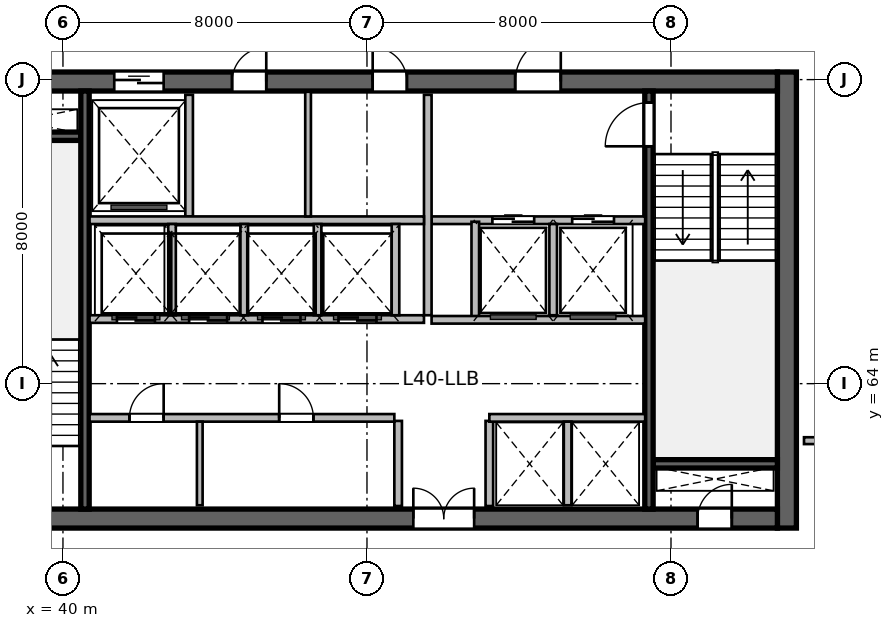
"""IFC4 building model, lengths in metres.
Left out: names, types, materials, properties, quantities, classifications, styles, units other than length and angle.
Written with IfcOpenShell. Run it as: python <this file> out.ifc"""

import sys

from ifc_helpers import new_model, si_unit, direction, frame, frame_2d, origin, place, context, subcontext, project, spatial, rectangle, extrude, source, transform, mapped, element, fill, save


model = new_model("IFC4")
c1 = context("Model", 3, precision=1e-05, world=origin(), true_north=direction((0.0, 1.0)))
c2 = subcontext(c1, "Body", "Model", "MODEL_VIEW")
j1 = project(units=[si_unit("LENGTHUNIT", "METRE"), si_unit("PLANEANGLEUNIT", "RADIAN")], contexts=[c1])
p1 = place(None, origin())
s1 = spatial("IfcSite", under=j1, at=p1, CompositionType="ELEMENT")
p2 = place(p1, origin())
s2 = spatial("IfcBuilding", under=s1, at=p2, CompositionType="ELEMENT")
p3 = place(p2, frame((0.0, 0.0, 166.2)))
s3 = spatial("IfcBuildingStorey", under=s2, at=p3, CompositionType="ELEMENT", Elevation=166.2)
m1 = source(origin(), c2, "Body", "SweptSolid", [
    extrude(rectangle(XDim=12.0, YDim=0.5, at=frame_2d((6.0, 0.0))), origin(), (0.0, 0.0, 1.0), 3.9),
])
p4 = place(p3, frame((59.05, 60.2, 0.0), z_axis=(0.0, 0.0, 1.0), x_axis=(0.0, 1.0, 0.0)))
e1 = element("IfcWall", 1, at=p4, inside=s3, PredefinedType="SHEAR", context=c2, shape_type="MappedRepresentation", body=[
    mapped(m1, transform((0.0, 0.0, 0.0), scale=1.0)),
])
m2 = source(origin(), c2, "Body", "SweptSolid", [
    extrude(rectangle(XDim=21.6, YDim=0.5, at=frame_2d((10.8, 0.0))), origin(), (0.0, 0.0, 1.0), 3.9),
])
p5 = place(p3, frame((37.2, 60.45, 0.0), z_axis=(0.0, 0.0, 1.0), x_axis=(1.0, 0.0, 0.0)))
e2 = element("IfcWall", 2, at=p5, inside=s3, PredefinedType="SHEAR", context=c2, shape_type="MappedRepresentation", body=[
    mapped(m2, transform((0.0, 0.0, 0.0), scale=1.0)),
])
p6 = place(p5, frame((1.1, 0.0, 0.0)))
e3 = element("IfcOpeningElement", 3, at=p6, cuts=e2, PredefinedType="OPENING", context=c2, shape_type="SweptSolid", body=[
    extrude(rectangle(XDim=1.15, YDim=2.15, at=frame_2d((0.575, 1.075))), frame((0.0, 0.26, 0.0), z_axis=(0.0, -1.0, 0.0), x_axis=(1.0, 0.0, 0.0)), (0.0, 0.0, 1.0), 0.52),
])
p7 = place(p5, frame((19.5, 0.0, 0.0)))
e4 = element("IfcOpeningElement", 4, at=p7, cuts=e2, PredefinedType="OPENING", context=c2, shape_type="SweptSolid", body=[
    extrude(rectangle(XDim=0.9, YDim=2.1, at=frame_2d((0.45, 1.05))), frame((0.0, 0.26, 0.0), z_axis=(0.0, -1.0, 0.0), x_axis=(1.0, 0.0, 0.0)), (0.0, 0.0, 1.0), 0.52),
])
p8 = place(p5, frame((12.02, 0.0, 0.0)))
e5 = element("IfcOpeningElement", 5, at=p8, cuts=e2, PredefinedType="OPENING", context=c2, shape_type="SweptSolid", body=[
    extrude(rectangle(XDim=1.6, YDim=2.15, at=frame_2d((0.8, 1.075))), frame((0.0, 0.26, 0.0), z_axis=(0.0, -1.0, 0.0), x_axis=(1.0, 0.0, 0.0)), (0.0, 0.0, 1.0), 0.52),
])
p9 = place(p3, frame((37.2, 71.95, 0.0), z_axis=(0.0, 0.0, 1.0), x_axis=(1.0, 0.0, 0.0)))
e6 = element("IfcWall", 6, at=p9, inside=s3, PredefinedType="SHEAR", context=c2, shape_type="MappedRepresentation", body=[
    mapped(m2, transform((0.0, 0.0, 0.0), scale=1.0)),
])
p10 = place(p9, frame((1.2, 0.0, 0.0)))
e7 = element("IfcOpeningElement", 7, at=p10, cuts=e6, PredefinedType="OPENING", context=c2, shape_type="SweptSolid", body=[
    extrude(rectangle(XDim=0.9, YDim=2.1, at=frame_2d((0.45, 1.05))), frame((0.0, 0.26, 0.0), z_axis=(0.0, -1.0, 0.0), x_axis=(1.0, 0.0, 0.0)), (0.0, 0.0, 1.0), 0.52),
])
p11 = place(p9, frame((14.7, 0.0, 0.0)))
e8 = element("IfcOpeningElement", 8, at=p11, cuts=e6, PredefinedType="OPENING", context=c2, shape_type="SweptSolid", body=[
    extrude(rectangle(XDim=1.2, YDim=2.15, at=frame_2d((0.6, 1.075))), frame((0.0, 0.26, 0.0), z_axis=(0.0, -1.0, 0.0), x_axis=(1.0, 0.0, 0.0)), (0.0, 0.0, 1.0), 0.52),
])
p12 = place(p9, frame((4.15, 0.0, 0.0)))
e9 = element("IfcOpeningElement", 9, at=p12, cuts=e6, PredefinedType="OPENING", context=c2, shape_type="SweptSolid", body=[
    extrude(rectangle(XDim=1.3, YDim=2.15, at=frame_2d((0.65, 1.075))), frame((0.0, 0.26, 0.0), z_axis=(0.0, -1.0, 0.0), x_axis=(1.0, 0.0, 0.0)), (0.0, 0.0, 1.0), 0.52),
])
p13 = place(p9, frame((7.25, 0.0, 0.0)))
e10 = element("IfcOpeningElement", 10, at=p13, cuts=e6, PredefinedType="OPENING", context=c2, shape_type="SweptSolid", body=[
    extrude(rectangle(XDim=0.9, YDim=2.1, at=frame_2d((0.45, 1.05))), frame((0.0, 0.26, 0.0), z_axis=(0.0, -1.0, 0.0), x_axis=(1.0, 0.0, 0.0)), (0.0, 0.0, 1.0), 0.52),
])
p14 = place(p9, frame((10.95, 0.0, 0.0)))
e11 = element("IfcOpeningElement", 11, at=p14, cuts=e6, PredefinedType="OPENING", context=c2, shape_type="SweptSolid", body=[
    extrude(rectangle(XDim=0.9, YDim=2.1, at=frame_2d((0.45, 1.05))), frame((0.0, 0.26, 0.0), z_axis=(0.0, -1.0, 0.0), x_axis=(1.0, 0.0, 0.0)), (0.0, 0.0, 1.0), 0.52),
])
m3 = source(origin(), c2, "Body", "SweptSolid", [
    extrude(rectangle(XDim=3.27, YDim=0.22, at=frame_2d((1.635, 0.0))), origin(), (0.0, 0.0, 1.0), 3.9),
])
for number, where, z_axis, x_axis in (
    (12, (37.2, 70.51, 0.0), (0.0, 0.0, 1.0), (1.0, 0.0, 0.0)),
    (13, (55.53, 61.89, 0.0), (0.0, 0.0, 1.0), (1.0, 0.0, 0.0)),
):
    element("IfcWall", number, at=place(p3, frame(where, z_axis=z_axis, x_axis=x_axis)), inside=s3, PredefinedType="SHEAR", context=c2, shape_type="MappedRepresentation", body=[
        mapped(m3, transform((0.0, 0.0, 0.0), scale=1.0)),
    ])
m4 = source(origin(), c2, "Body", "SweptSolid", [
    extrude(rectangle(XDim=11.0, YDim=0.22, at=frame_2d((5.5, 0.0))), origin(), (0.0, 0.0, 1.0), 3.9),
])
p15 = place(p3, frame((40.58, 60.7, 0.0), z_axis=(0.0, 0.0, 1.0), x_axis=(0.0, 1.0, 0.0)))
e14 = element("IfcWall", 14, at=p15, inside=s3, PredefinedType="SHEAR", context=c2, shape_type="MappedRepresentation", body=[
    mapped(m4, transform((0.0, 0.0, 0.0), scale=1.0)),
])
p16 = place(p3, frame((55.42, 60.7, 0.0), z_axis=(0.0, 0.0, 1.0), x_axis=(0.0, 1.0, 0.0)))
e15 = element("IfcWall", 15, at=p16, inside=s3, PredefinedType="SHEAR", context=c2, shape_type="MappedRepresentation", body=[
    mapped(m4, transform((0.0, 0.0, 0.0), scale=1.0)),
])
p17 = place(p16, frame((9.545, 0.0, 0.0)))
e16 = element("IfcOpeningElement", 16, at=p17, cuts=e15, PredefinedType="OPENING", context=c2, shape_type="SweptSolid", body=[
    extrude(rectangle(XDim=1.15, YDim=2.15, at=frame_2d((0.575, 1.075))), frame((0.0, 0.12, 0.0), z_axis=(0.0, -1.0, 0.0), x_axis=(1.0, 0.0, 0.0)), (0.0, 0.0, 1.0), 0.24),
])
m5 = source(origin(), c2, "Body", "SweptSolid", [
    extrude(rectangle(XDim=2.24, YDim=0.2, at=frame_2d((1.12, 0.0))), origin(), (0.0, 0.0, 1.0), 3.65),
])
for number, where, z_axis, x_axis in (
    (17, (48.82, 60.78, 0.0), (0.0, 0.0, 1.0), (0.0, 1.0, 0.0)),
    (18, (51.22, 60.78, 0.0), (0.0, 0.0, 1.0), (0.0, 1.0, 0.0)),
):
    element("IfcWall", number, at=place(p3, frame(where, z_axis=z_axis, x_axis=x_axis)), inside=s3, PredefinedType="SOLIDWALL", context=c2, shape_type="MappedRepresentation", body=[
        mapped(m5, transform((0.0, 0.0, 0.0), scale=1.0)),
    ])
m6 = source(origin(), c2, "Body", "SweptSolid", [
    extrude(rectangle(XDim=5.62, YDim=0.2, at=frame_2d((2.81, 0.0))), origin(), (0.0, 0.0, 1.0), 3.65),
])
p18 = place(p3, frame((49.7, 68.3, 0.0), z_axis=(0.0, 0.0, 1.0), x_axis=(1.0, 0.0, 0.0)))
e19 = element("IfcWall", 19, at=p18, inside=s3, PredefinedType="SOLIDWALL", context=c2, shape_type="MappedRepresentation", body=[
    mapped(m6, transform((0.0, 0.0, 0.0), scale=1.0)),
])
p19 = place(p18, frame((1.6, 0.0, 0.0)))
e20 = element("IfcOpeningElement", 20, at=p19, cuts=e19, PredefinedType="OPENING", context=c2, shape_type="SweptSolid", body=[
    extrude(rectangle(XDim=1.1, YDim=2.15, at=frame_2d((0.55, 1.075))), frame((0.0, 0.11, 0.0), z_axis=(0.0, -1.0, 0.0), x_axis=(1.0, 0.0, 0.0)), (0.0, 0.0, 1.0), 0.22),
])
p20 = place(p18, frame((3.7, 0.0, 0.0)))
e21 = element("IfcOpeningElement", 21, at=p20, cuts=e19, PredefinedType="OPENING", context=c2, shape_type="SweptSolid", body=[
    extrude(rectangle(XDim=1.1, YDim=2.15, at=frame_2d((0.55, 1.075))), frame((0.0, 0.11, 0.0), z_axis=(0.0, -1.0, 0.0), x_axis=(1.0, 0.0, 0.0)), (0.0, 0.0, 1.0), 0.22),
])
m7 = source(origin(), c2, "Body", "SweptSolid", [
    extrude(rectangle(XDim=5.8, YDim=0.2, at=frame_2d((2.9, 0.0))), origin(), (0.0, 0.0, 1.0), 3.65),
])
p21 = place(p3, frame((49.6, 65.8, 0.0), z_axis=(0.0, 0.0, 1.0), x_axis=(0.0, 1.0, 0.0)))
e22 = element("IfcWall", 22, at=p21, inside=s3, PredefinedType="SOLIDWALL", context=c2, shape_type="MappedRepresentation", body=[
    mapped(m7, transform((0.0, 0.0, 0.0), scale=1.0)),
])
m8 = source(origin(), c2, "Body", "SweptSolid", [
    extrude(rectangle(XDim=2.58, YDim=0.2, at=frame_2d((1.29, 0.0))), origin(), (0.0, 0.0, 1.0), 3.65),
])
p22 = place(p3, frame((50.85, 65.68, 0.0), z_axis=(0.0, 0.0, 1.0), x_axis=(0.0, 1.0, 0.0)))
e23 = element("IfcWall", 23, at=p22, inside=s3, PredefinedType="SOLIDWALL", context=c2, shape_type="MappedRepresentation", body=[
    mapped(m8, transform((0.0, 0.0, 0.0), scale=1.0)),
])
m9 = source(origin(), c2, "Body", "SweptSolid", [
    extrude(rectangle(XDim=2.4, YDim=0.2, at=frame_2d((1.2, 0.0))), origin(), (0.0, 0.0, 1.0), 3.65),
])
p23 = place(p3, frame((52.9, 65.8, 0.0), z_axis=(0.0, 0.0, 1.0), x_axis=(0.0, 1.0, 0.0)))
e24 = element("IfcWall", 24, at=p23, inside=s3, PredefinedType="SOLIDWALL", context=c2, shape_type="MappedRepresentation", body=[
    mapped(m9, transform((0.0, 0.0, 0.0), scale=1.0)),
])
p24 = place(p3, frame((49.7, 65.68, 0.0), z_axis=(0.0, 0.0, 1.0), x_axis=(1.0, 0.0, 0.0)))
e25 = element("IfcWall", 25, at=p24, inside=s3, PredefinedType="SOLIDWALL", context=c2, shape_type="MappedRepresentation", body=[
    mapped(m6, transform((0.0, 0.0, 0.0), scale=1.0)),
])
m10 = source(origin(), c2, "Body", "SweptSolid", [
    extrude(rectangle(XDim=3.2, YDim=0.2, at=frame_2d((1.6, 0.0))), origin(), (0.0, 0.0, 1.0), 3.65),
])
p25 = place(p3, frame((43.32, 68.4, 0.0), z_axis=(0.0, 0.0, 1.0), x_axis=(0.0, 1.0, 0.0)))
e26 = element("IfcWall", 26, at=p25, inside=s3, PredefinedType="SOLIDWALL", context=c2, shape_type="MappedRepresentation", body=[
    mapped(m10, transform((0.0, 0.0, 0.0), scale=1.0)),
])
m11 = source(origin(), c2, "Body", "SweptSolid", [
    extrude(rectangle(XDim=8.8, YDim=0.2, at=frame_2d((4.4, 0.0))), origin(), (0.0, 0.0, 1.0), 3.65),
])
p26 = place(p3, frame((40.7, 68.3, 0.0), z_axis=(0.0, 0.0, 1.0), x_axis=(1.0, 0.0, 0.0)))
e27 = element("IfcWall", 27, at=p26, inside=s3, PredefinedType="SOLIDWALL", context=c2, shape_type="MappedRepresentation", body=[
    mapped(m11, transform((0.0, 0.0, 0.0), scale=1.0)),
])
m12 = source(origin(), c2, "Body", "SweptSolid", [
    extrude(rectangle(XDim=3.28, YDim=0.15, at=frame_2d((1.64, 0.0))), origin(), (0.0, 0.0, 1.0), 3.65),
])
p27 = place(p3, frame((46.45, 68.4, 0.0), z_axis=(0.0, 0.0, 1.0), x_axis=(0.0, 1.0, 0.0)))
e28 = element("IfcWall", 28, at=p27, inside=s3, PredefinedType="PARTITIONING", context=c2, shape_type="MappedRepresentation", body=[
    mapped(m12, transform((0.0, 0.0, 0.0), scale=1.0)),
])
m13 = source(origin(), c2, "Body", "SweptSolid", [
    extrude(rectangle(XDim=8.02, YDim=0.2, at=frame_2d((4.01, 0.0))), origin(), (0.0, 0.0, 1.0), 3.65),
])
p28 = place(p3, frame((40.7, 63.1, 0.0), z_axis=(0.0, 0.0, 1.0), x_axis=(1.0, 0.0, 0.0)))
e29 = element("IfcWall", 29, at=p28, inside=s3, PredefinedType="SOLIDWALL", context=c2, shape_type="MappedRepresentation", body=[
    mapped(m13, transform((0.0, 0.0, 0.0), scale=1.0)),
])
p29 = place(p28, frame((1.05, 0.0, 0.0)))
e30 = element("IfcOpeningElement", 30, at=p29, cuts=e29, PredefinedType="OPENING", context=c2, shape_type="SweptSolid", body=[
    extrude(rectangle(XDim=0.9, YDim=2.1, at=frame_2d((0.45, 1.05))), frame((0.0, 0.11, 0.0), z_axis=(0.0, -1.0, 0.0), x_axis=(1.0, 0.0, 0.0)), (0.0, 0.0, 1.0), 0.22),
])
p30 = place(p28, frame((4.99, 0.0, 0.0)))
e31 = element("IfcOpeningElement", 31, at=p30, cuts=e29, PredefinedType="OPENING", context=c2, shape_type="SweptSolid", body=[
    extrude(rectangle(XDim=0.9, YDim=2.1, at=frame_2d((0.45, 1.05))), frame((0.0, 0.11, 0.0), z_axis=(0.0, -1.0, 0.0), x_axis=(1.0, 0.0, 0.0)), (0.0, 0.0, 1.0), 0.22),
])
m14 = source(origin(), c2, "Body", "SweptSolid", [
    extrude(rectangle(XDim=4.1, YDim=0.2, at=frame_2d((2.05, 0.0))), origin(), (0.0, 0.0, 1.0), 3.65),
])
p31 = place(p3, frame((51.22, 63.1, 0.0), z_axis=(0.0, 0.0, 1.0), x_axis=(1.0, 0.0, 0.0)))
e32 = element("IfcWall", 32, at=p31, inside=s3, PredefinedType="SOLIDWALL", context=c2, shape_type="MappedRepresentation", body=[
    mapped(m14, transform((0.0, 0.0, 0.0), scale=1.0)),
])
m15 = source(origin(), c2, "Body", "SweptSolid", [
    extrude(rectangle(XDim=2.2, YDim=0.15, at=frame_2d((1.1, 0.0))), origin(), (0.0, 0.0, 1.0), 3.65),
])
p32 = place(p3, frame((43.6, 60.8, 0.0), z_axis=(0.0, 0.0, 1.0), x_axis=(0.0, 1.0, 0.0)))
e33 = element("IfcWall", 33, at=p32, inside=s3, PredefinedType="PARTITIONING", context=c2, shape_type="MappedRepresentation", body=[
    mapped(m15, transform((0.0, 0.0, 0.0), scale=1.0)),
])
m16 = source(origin(), c2, "Body", "SweptSolid", [
    extrude(rectangle(XDim=2.2, YDim=0.2, at=frame_2d((1.1, 0.0))), origin(), (0.0, 0.0, 1.0), 3.65),
])
p33 = place(p3, frame((53.28, 60.8, 0.0), z_axis=(0.0, 0.0, 1.0), x_axis=(0.0, 1.0, 0.0)))
e34 = element("IfcWall", 34, at=p33, inside=s3, PredefinedType="SOLIDWALL", context=c2, shape_type="MappedRepresentation", body=[
    mapped(m16, transform((0.0, 0.0, 0.0), scale=1.0)),
])
p34 = place(p3, frame((40.7, 65.7, 0.0), z_axis=(0.0, 0.0, 1.0), x_axis=(1.0, 0.0, 0.0)))
e35 = element("IfcWall", 35, at=p34, inside=s3, PredefinedType="SOLIDWALL", context=c2, shape_type="MappedRepresentation", body=[
    mapped(m11, transform((0.0, 0.0, 0.0), scale=1.0)),
])
p35 = place(p34, frame((0.72, 0.0, 0.0)))
e36 = element("IfcOpeningElement", 36, at=p35, cuts=e35, PredefinedType="OPENING", context=c2, shape_type="SweptSolid", body=[
    extrude(rectangle(XDim=1.0, YDim=2.15, at=frame_2d((0.5, 1.075))), frame((0.0, 0.11, 0.0), z_axis=(0.0, -1.0, 0.0), x_axis=(1.0, 0.0, 0.0)), (0.0, 0.0, 1.0), 0.22),
])
p36 = place(p34, frame((2.62, 0.0, 0.0)))
e37 = element("IfcOpeningElement", 37, at=p36, cuts=e35, PredefinedType="OPENING", context=c2, shape_type="SweptSolid", body=[
    extrude(rectangle(XDim=1.0, YDim=2.15, at=frame_2d((0.5, 1.075))), frame((0.0, 0.11, 0.0), z_axis=(0.0, -1.0, 0.0), x_axis=(1.0, 0.0, 0.0)), (0.0, 0.0, 1.0), 0.22),
])
p37 = place(p34, frame((4.55, 0.0, 0.0)))
e38 = element("IfcOpeningElement", 38, at=p37, cuts=e35, PredefinedType="OPENING", context=c2, shape_type="SweptSolid", body=[
    extrude(rectangle(XDim=1.0, YDim=2.15, at=frame_2d((0.5, 1.075))), frame((0.0, 0.11, 0.0), z_axis=(0.0, -1.0, 0.0), x_axis=(1.0, 0.0, 0.0)), (0.0, 0.0, 1.0), 0.22),
])
p38 = place(p34, frame((6.55, 0.0, 0.0)))
e39 = element("IfcOpeningElement", 39, at=p38, cuts=e35, PredefinedType="OPENING", context=c2, shape_type="SweptSolid", body=[
    extrude(rectangle(XDim=1.0, YDim=2.15, at=frame_2d((0.5, 1.075))), frame((0.0, 0.11, 0.0), z_axis=(0.0, -1.0, 0.0), x_axis=(1.0, 0.0, 0.0)), (0.0, 0.0, 1.0), 0.22),
])
for number, where, z_axis, x_axis in (
    (40, (48.75, 65.8, 0.0), (0.0, 0.0, 1.0), (0.0, 1.0, 0.0)),
    (41, (42.87, 65.8, 0.0), (0.0, 0.0, 1.0), (0.0, 1.0, 0.0)),
    (42, (44.77, 65.8, 0.0), (0.0, 0.0, 1.0), (0.0, 1.0, 0.0)),
    (43, (46.7, 65.8, 0.0), (0.0, 0.0, 1.0), (0.0, 1.0, 0.0)),
):
    element("IfcWall", number, at=place(p3, frame(where, z_axis=z_axis, x_axis=x_axis)), inside=s3, PredefinedType="SOLIDWALL", context=c2, shape_type="MappedRepresentation", body=[
        mapped(m9, transform((0.0, 0.0, 0.0), scale=1.0)),
    ])
m17 = source(origin(), c2, "Body", "SweptSolid", [
    extrude(rectangle(XDim=4.96, YDim=0.18, at=frame_2d((2.48, 0.0))), origin(), (0.0, 0.0, 1.0), 3.65),
])
p39 = place(p3, frame((59.5, 62.5, 0.0), z_axis=(0.0, 0.0, 1.0), x_axis=(1.0, 0.0, 0.0)))
e44 = element("IfcWall", 44, at=p39, inside=s3, PredefinedType="PLUMBINGWALL", context=c2, shape_type="MappedRepresentation", body=[
    mapped(m17, transform((0.0, 0.0, 0.0), scale=1.0)),
])
m18 = source(origin(), c2, "Body", "SweptSolid", [
    extrude(rectangle(XDim=0.9, YDim=2.1, at=frame_2d((0.45, 1.05))), frame((0.0, 0.025, 0.0), z_axis=(0.0, -1.0, 0.0), x_axis=(1.0, 0.0, 0.0)), (0.0, 0.0, 1.0), 0.05),
])
p40 = place(p7, origin())
e45 = element("IfcDoor", 45, at=p40, inside=s3, OperationType="SINGLE_SWING_RIGHT", PredefinedType="DOOR", context=c2, shape_type="MappedRepresentation", body=[
    mapped(m18, transform((0.0, 0.0, 0.0), scale=1.0)),
])
fill(e4, e45)
m19 = source(origin(), c2, "Body", "SweptSolid", [
    extrude(rectangle(XDim=1.15, YDim=2.15, at=frame_2d((0.575, 1.075))), frame((0.0, 0.025, 0.0), z_axis=(0.0, -1.0, 0.0), x_axis=(1.0, 0.0, 0.0)), (0.0, 0.0, 1.0), 0.05),
])
p41 = place(p17, origin())
e46 = element("IfcDoor", 46, at=p41, inside=s3, OperationType="SINGLE_SWING_LEFT", PredefinedType="DOOR", context=c2, shape_type="MappedRepresentation", body=[
    mapped(m19, transform((0.0, 0.0, 0.0), scale=1.0)),
])
fill(e16, e46)
m20 = source(origin(), c2, "Body", "SweptSolid", [
    extrude(rectangle(XDim=1.6, YDim=2.15, at=frame_2d((0.8, 1.075))), frame((0.0, 0.025, 0.0), z_axis=(0.0, -1.0, 0.0), x_axis=(1.0, 0.0, 0.0)), (0.0, 0.0, 1.0), 0.05),
])
p42 = place(p8, origin())
e47 = element("IfcDoor", 47, at=p42, inside=s3, OperationType="DOUBLE_DOOR_SINGLE_SWING", PredefinedType="DOOR", context=c2, shape_type="MappedRepresentation", body=[
    mapped(m20, transform((0.0, 0.0, 0.0), scale=1.0)),
])
fill(e5, e47)
m21 = source(origin(), c2, "Body", "SweptSolid", [
    extrude(rectangle(XDim=1.2, YDim=2.15, at=frame_2d((0.6, 1.075))), frame((0.0, 0.025, 0.0), z_axis=(0.0, -1.0, 0.0), x_axis=(1.0, 0.0, 0.0)), (0.0, 0.0, 1.0), 0.05),
])
p43 = place(p11, origin())
e48 = element("IfcDoor", 48, at=p43, inside=s3, OperationType="SINGLE_SWING_RIGHT", PredefinedType="DOOR", context=c2, shape_type="MappedRepresentation", body=[
    mapped(m21, transform((0.0, 0.0, 0.0), scale=1.0)),
])
fill(e8, e48)
m22 = source(origin(), c2, "Body", "SweptSolid", [
    extrude(rectangle(XDim=1.1, YDim=2.15, at=frame_2d((0.55, 1.075))), frame((0.0, 0.025, 0.0), z_axis=(0.0, -1.0, 0.0), x_axis=(1.0, 0.0, 0.0)), (0.0, 0.0, 1.0), 0.05),
])
p44 = place(p19, origin())
e49 = element("IfcDoor", 49, at=p44, inside=s3, OperationType="DOUBLE_DOOR_SLIDING", PredefinedType="DOOR", context=c2, shape_type="MappedRepresentation", body=[
    mapped(m22, transform((0.0, 0.0, 0.0), scale=1.0)),
])
fill(e20, e49)
p45 = place(p20, origin())
e50 = element("IfcDoor", 50, at=p45, inside=s3, OperationType="DOUBLE_DOOR_SLIDING", PredefinedType="DOOR", context=c2, shape_type="MappedRepresentation", body=[
    mapped(m22, transform((0.0, 0.0, 0.0), scale=1.0)),
])
fill(e21, e50)
m23 = source(origin(), c2, "Body", "SweptSolid", [
    extrude(rectangle(XDim=1.3, YDim=2.15, at=frame_2d((0.65, 1.075))), frame((0.0, 0.025, 0.0), z_axis=(0.0, -1.0, 0.0), x_axis=(1.0, 0.0, 0.0)), (0.0, 0.0, 1.0), 0.05),
])
p46 = place(p12, origin())
e51 = element("IfcDoor", 51, at=p46, inside=s3, OperationType="DOUBLE_DOOR_SLIDING", PredefinedType="DOOR", context=c2, shape_type="MappedRepresentation", body=[
    mapped(m23, transform((0.0, 0.0, 0.0), scale=1.0)),
])
fill(e9, e51)
p47 = place(p13, origin())
e52 = element("IfcDoor", 52, at=p47, inside=s3, OperationType="SINGLE_SWING_RIGHT", PredefinedType="DOOR", context=c2, shape_type="MappedRepresentation", body=[
    mapped(m18, transform((0.0, 0.0, 0.0), scale=1.0)),
])
fill(e10, e52)
p48 = place(p14, origin())
e53 = element("IfcDoor", 53, at=p48, inside=s3, OperationType="SINGLE_SWING_LEFT", PredefinedType="DOOR", context=c2, shape_type="MappedRepresentation", body=[
    mapped(m18, transform((0.0, 0.0, 0.0), scale=1.0)),
])
fill(e11, e53)
p49 = place(p29, origin())
e54 = element("IfcDoor", 54, at=p49, inside=s3, OperationType="SINGLE_SWING_RIGHT", PredefinedType="DOOR", context=c2, shape_type="MappedRepresentation", body=[
    mapped(m18, transform((0.0, 0.0, 0.0), scale=1.0)),
])
fill(e30, e54)
p50 = place(p30, origin())
e55 = element("IfcDoor", 55, at=p50, inside=s3, OperationType="SINGLE_SWING_LEFT", PredefinedType="DOOR", context=c2, shape_type="MappedRepresentation", body=[
    mapped(m18, transform((0.0, 0.0, 0.0), scale=1.0)),
])
fill(e31, e55)
m24 = source(origin(), c2, "Body", "SweptSolid", [
    extrude(rectangle(XDim=1.0, YDim=2.15, at=frame_2d((0.5, 1.075))), frame((0.0, 0.025, 0.0), z_axis=(0.0, -1.0, 0.0), x_axis=(1.0, 0.0, 0.0)), (0.0, 0.0, 1.0), 0.05),
])
p51 = place(p35, origin())
e56 = element("IfcDoor", 56, at=p51, inside=s3, OperationType="DOUBLE_DOOR_SLIDING", PredefinedType="DOOR", context=c2, shape_type="MappedRepresentation", body=[
    mapped(m24, transform((0.0, 0.0, 0.0), scale=1.0)),
])
fill(e36, e56)
p52 = place(p36, origin())
e57 = element("IfcDoor", 57, at=p52, inside=s3, OperationType="DOUBLE_DOOR_SLIDING", PredefinedType="DOOR", context=c2, shape_type="MappedRepresentation", body=[
    mapped(m24, transform((0.0, 0.0, 0.0), scale=1.0)),
])
fill(e37, e57)
p53 = place(p37, origin())
e58 = element("IfcDoor", 58, at=p53, inside=s3, OperationType="DOUBLE_DOOR_SLIDING", PredefinedType="DOOR", context=c2, shape_type="MappedRepresentation", body=[
    mapped(m24, transform((0.0, 0.0, 0.0), scale=1.0)),
])
fill(e38, e58)
p54 = place(p38, origin())
e59 = element("IfcDoor", 59, at=p54, inside=s3, OperationType="DOUBLE_DOOR_SLIDING", PredefinedType="DOOR", context=c2, shape_type="MappedRepresentation", body=[
    mapped(m24, transform((0.0, 0.0, 0.0), scale=1.0)),
])
fill(e39, e59)
save(model, sys.argv[1])
